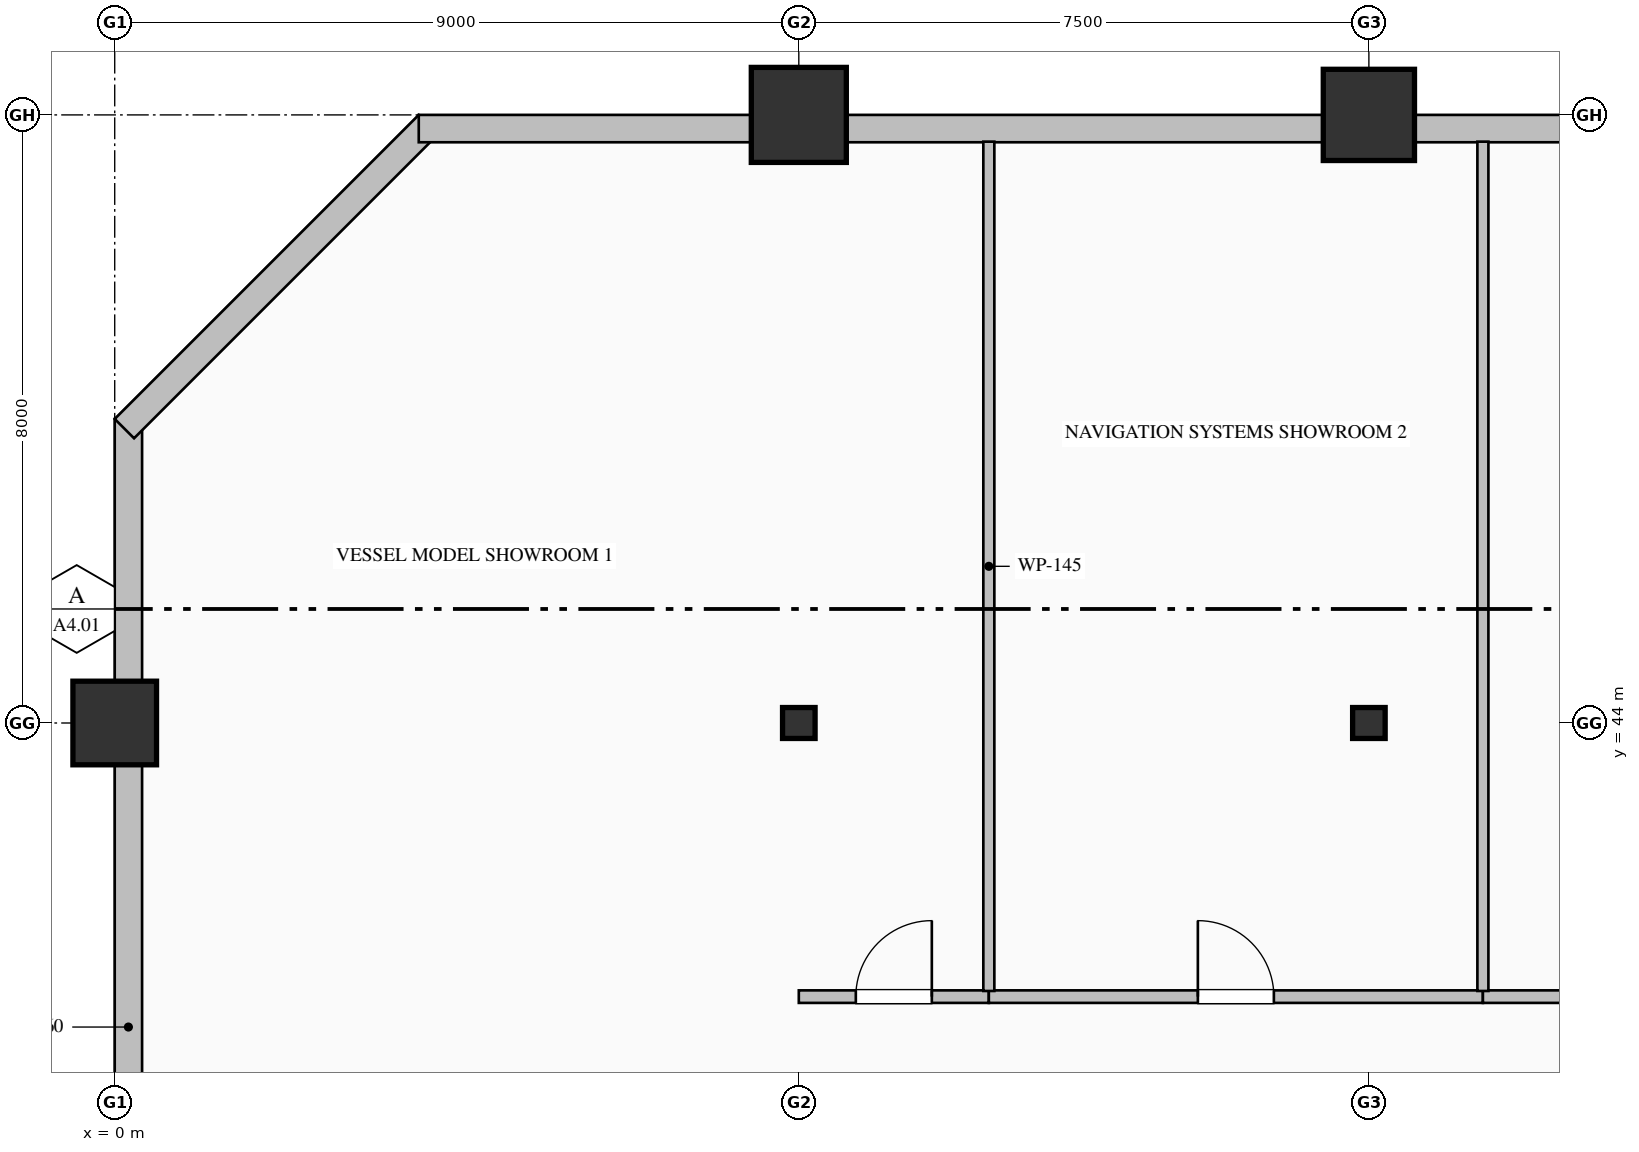
"""IFC4 building model, lengths in metres.
Left out: names, types, materials, properties, quantities, classifications, styles, units other than length and angle.
Written with IfcOpenShell. Run it as: python <this file> out.ifc"""

import sys

from ifc_helpers import new_model, si_unit, direction, frame, frame_2d, origin, origin_2d, place, context, subcontext, project, spatial, rectangle, hollow_rectangle, hollow_circle, i_section, extrude, element, fill, save


model = new_model("IFC4")
c1 = context("Model", 3, precision=1e-05, world=origin(), true_north=direction((0.0, 1.0)))
c2 = subcontext(c1, "Body", "Model", "MODEL_VIEW")
j1 = project(units=[si_unit("LENGTHUNIT", "METRE"), si_unit("PLANEANGLEUNIT", "RADIAN")], contexts=[c1])
p1 = place(None, origin())
s1 = spatial("IfcSite", under=j1, at=p1, CompositionType="ELEMENT")
p2 = place(p1, origin())
s2 = spatial("IfcBuilding", under=s1, at=p2, CompositionType="ELEMENT")
p3 = place(p2, frame((0.0, 0.0, 92.2)))
s3 = spatial("IfcBuildingStorey", under=s2, at=p3, CompositionType="ELEMENT", Elevation=92.2)
p4 = place(p3, frame((0.0, 44.0, 0.0), z_axis=(0.0, 0.0, 1.0), x_axis=(1.0, 0.0, 0.0)))
e1 = element("IfcColumn", 1, at=p4, inside=s3, PredefinedType="COLUMN", context=c2, shape_type="SweptSolid", body=[
    extrude(hollow_rectangle(XDim=1.1, YDim=1.1, WallThickness=0.04, at=origin_2d()), origin(), (0.0, 0.0, 1.0), 4.0),
])
p5 = place(p3, frame((9.0, 44.0, 0.0), z_axis=(0.0, 0.0, 1.0), x_axis=(1.0, 0.0, 0.0)))
e2 = element("IfcColumn", 2, at=p5, inside=s3, PredefinedType="COLUMN", context=c2, shape_type="SweptSolid", body=[
    extrude(i_section(OverallWidth=0.407, OverallDepth=0.428, WebThickness=0.02, FlangeThickness=0.035, FilletRadius=0.022, at=origin_2d()), origin(), (0.0, 0.0, 1.0), 4.0),
])
p6 = place(p3, frame((9.0, 52.0, 0.0), z_axis=(0.0, 0.0, 1.0), x_axis=(1.0, 0.0, 0.0)))
e3 = element("IfcColumn", 3, at=p6, inside=s3, PredefinedType="COLUMN", context=c2, shape_type="SweptSolid", body=[
    extrude(hollow_rectangle(XDim=1.25, YDim=1.25, WallThickness=0.045, at=origin_2d()), origin(), (0.0, 0.0, 1.0), 4.0),
])
p7 = place(p3, frame((16.5, 44.0, 0.0), z_axis=(0.0, 0.0, 1.0), x_axis=(1.0, 0.0, 0.0)))
e4 = element("IfcColumn", 4, at=p7, inside=s3, PredefinedType="COLUMN", context=c2, shape_type="SweptSolid", body=[
    extrude(i_section(OverallWidth=0.407, OverallDepth=0.428, WebThickness=0.02, FlangeThickness=0.035, FilletRadius=0.022, at=origin_2d()), origin(), (0.0, 0.0, 1.0), 4.0),
])
p8 = place(p3, frame((16.5, 52.0, 0.0), z_axis=(0.0, 0.0, 1.0), x_axis=(1.0, 0.0, 0.0)))
e5 = element("IfcColumn", 5, at=p8, inside=s3, PredefinedType="COLUMN", context=c2, shape_type="SweptSolid", body=[
    extrude(hollow_circle(Radius=0.6, WallThickness=0.04, at=origin_2d()), origin(), (0.0, 0.0, 1.0), 4.0),
])
p9 = place(p3, frame((0.18, 32.0, 0.0), z_axis=(0.0, 0.0, 1.0), x_axis=(0.0, 1.0, 0.0)))
e6 = element("IfcWall", 6, at=p9, inside=s3, PredefinedType="SOLIDWALL", context=c2, shape_type="SweptSolid", body=[
    extrude(rectangle(XDim=16.0, YDim=0.36, at=frame_2d((8.0, 0.0))), origin(), (0.0, 0.0, 1.0), 3.25),
])
p10 = place(p3, frame((0.127, 47.873, 0.0), z_axis=(0.0, 0.0, 1.0), x_axis=(0.707106781187, 0.707106781187, 0.0)))
e7 = element("IfcWall", 7, at=p10, inside=s3, PredefinedType="SOLIDWALL", context=c2, shape_type="SweptSolid", body=[
    extrude(rectangle(XDim=5.657, YDim=0.36, at=frame_2d((2.828, 0.0))), origin(), (0.0, 0.0, 1.0), 3.75),
])
p11 = place(p3, frame((4.0, 51.82, 0.0), z_axis=(0.0, 0.0, 1.0), x_axis=(1.0, 0.0, 0.0)))
e8 = element("IfcWall", 8, at=p11, inside=s3, PredefinedType="SOLIDWALL", context=c2, shape_type="SweptSolid", body=[
    extrude(rectangle(XDim=36.52, YDim=0.36, at=frame_2d((18.26, 0.0))), origin(), (0.0, 0.0, 1.0), 3.25),
])
p12 = place(p11, frame((16.95, 0.0, 0.85)))
e9 = element("IfcOpeningElement", 9, at=p12, cuts=e8, PredefinedType="OPENING", context=c2, shape_type="SweptSolid", body=[
    extrude(rectangle(XDim=2.1, YDim=2.05, at=frame_2d((1.05, 1.025))), frame((0.0, 0.19, 0.0), z_axis=(0.0, -1.0, 0.0), x_axis=(1.0, 0.0, 0.0)), (0.0, 0.0, 1.0), 0.38),
])
p13 = place(p11, frame((24.3, 0.0, 0.85)))
e10 = element("IfcOpeningElement", 10, at=p13, cuts=e8, PredefinedType="OPENING", context=c2, shape_type="SweptSolid", body=[
    extrude(rectangle(XDim=1.8, YDim=2.05, at=frame_2d((0.9, 1.025))), frame((0.0, 0.19, 0.0), z_axis=(0.0, -1.0, 0.0), x_axis=(1.0, 0.0, 0.0)), (0.0, 0.0, 1.0), 0.38),
])
p14 = place(p3, frame((9.0, 40.4, 0.0), z_axis=(0.0, 0.0, 1.0), x_axis=(1.0, 0.0, 0.0)))
e11 = element("IfcWall", 11, at=p14, inside=s3, PredefinedType="PARTITIONING", context=c2, shape_type="SweptSolid", body=[
    extrude(rectangle(XDim=2.5, YDim=0.165, at=frame_2d((1.25, 0.0))), origin(), (0.0, 0.0, 1.0), 3.75),
])
p15 = place(p14, frame((0.75, 0.0, 0.0)))
e12 = element("IfcOpeningElement", 12, at=p15, cuts=e11, PredefinedType="OPENING", context=c2, shape_type="SweptSolid", body=[
    extrude(rectangle(XDim=1.0, YDim=2.15, at=frame_2d((0.5, 1.075))), frame((0.0, 0.093, 0.0), z_axis=(0.0, -1.0, 0.0), x_axis=(1.0, 0.0, 0.0)), (0.0, 0.0, 1.0), 0.185),
])
p16 = place(p3, frame((11.5, 40.4, 0.0), z_axis=(0.0, 0.0, 1.0), x_axis=(1.0, 0.0, 0.0)))
e13 = element("IfcWall", 13, at=p16, inside=s3, PredefinedType="PARTITIONING", context=c2, shape_type="SweptSolid", body=[
    extrude(rectangle(XDim=6.5, YDim=0.165, at=frame_2d((3.25, 0.0))), origin(), (0.0, 0.0, 1.0), 3.75),
])
p17 = place(p16, frame((2.75, 0.0, 0.0)))
e14 = element("IfcOpeningElement", 14, at=p17, cuts=e13, PredefinedType="OPENING", context=c2, shape_type="SweptSolid", body=[
    extrude(rectangle(XDim=1.0, YDim=2.15, at=frame_2d((0.5, 1.075))), frame((0.0, 0.093, 0.0), z_axis=(0.0, -1.0, 0.0), x_axis=(1.0, 0.0, 0.0)), (0.0, 0.0, 1.0), 0.185),
])
p18 = place(p3, frame((18.0, 40.4, 0.0), z_axis=(0.0, 0.0, 1.0), x_axis=(1.0, 0.0, 0.0)))
e15 = element("IfcWall", 15, at=p18, inside=s3, PredefinedType="PARTITIONING", context=c2, shape_type="SweptSolid", body=[
    extrude(rectangle(XDim=6.5, YDim=0.165, at=frame_2d((3.25, 0.0))), origin(), (0.0, 0.0, 1.0), 3.75),
])
p19 = place(p18, frame((2.75, 0.0, 0.0)))
e16 = element("IfcOpeningElement", 16, at=p19, cuts=e15, PredefinedType="OPENING", context=c2, shape_type="SweptSolid", body=[
    extrude(rectangle(XDim=1.0, YDim=2.15, at=frame_2d((0.5, 1.075))), frame((0.0, 0.093, 0.0), z_axis=(0.0, -1.0, 0.0), x_axis=(1.0, 0.0, 0.0)), (0.0, 0.0, 1.0), 0.185),
])
for number, where, z_axis, x_axis in (
    (17, (11.5, 51.648, 0.0), (0.0, 0.0, 1.0), (0.0, -1.0, 0.0)),
    (18, (18.0, 51.648, 0.0), (0.0, 0.0, 1.0), (0.0, -1.0, 0.0)),
):
    element("IfcWall", number, at=place(p3, frame(where, z_axis=z_axis, x_axis=x_axis)), inside=s3, PredefinedType="PARTITIONING", context=c2, shape_type="SweptSolid", body=[
        extrude(rectangle(XDim=11.173, YDim=0.145, at=frame_2d((5.587, 0.0))), origin(), (0.0, 0.0, 1.0), 3.75),
    ])
p20 = place(p15, origin())
e19 = element("IfcDoor", 19, at=p20, inside=s3, OperationType="SINGLE_SWING_RIGHT", PredefinedType="DOOR", context=c2, shape_type="SweptSolid", body=[
    extrude(rectangle(XDim=1.0, YDim=2.15, at=frame_2d((0.5, 1.075))), frame((0.0, 0.025, 0.0), z_axis=(0.0, -1.0, 0.0), x_axis=(1.0, 0.0, 0.0)), (0.0, 0.0, 1.0), 0.05),
])
fill(e12, e19)
p21 = place(p17, origin())
e20 = element("IfcDoor", 20, at=p21, inside=s3, OperationType="SINGLE_SWING_LEFT", PredefinedType="DOOR", context=c2, shape_type="SweptSolid", body=[
    extrude(rectangle(XDim=1.0, YDim=2.15, at=frame_2d((0.5, 1.075))), frame((0.0, 0.025, 0.0), z_axis=(0.0, -1.0, 0.0), x_axis=(1.0, 0.0, 0.0)), (0.0, 0.0, 1.0), 0.05),
])
fill(e14, e20)
save(model, sys.argv[1])
